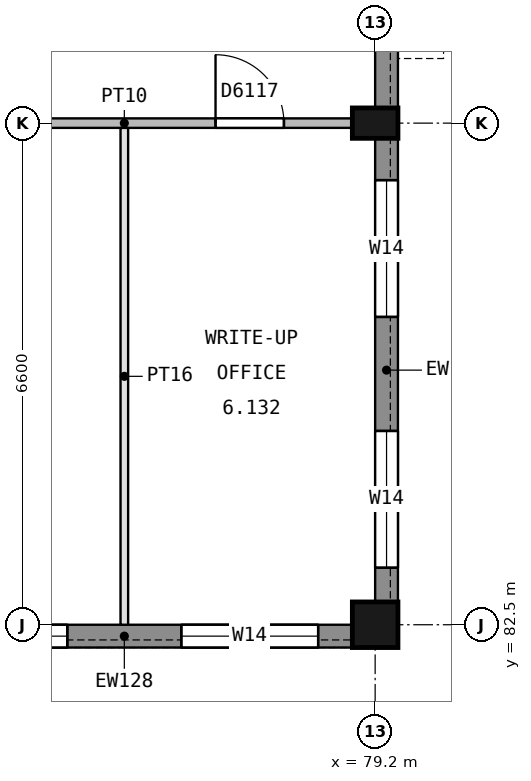
"""IFC4 building model, lengths in metres.
Left out: names, types, materials, properties, quantities, classifications, styles, units other than length and angle.
Written with IfcOpenShell. Run it as: python <this file> out.ifc"""

import sys

from ifc_helpers import new_model, si_unit, direction, frame, frame_2d, origin, origin_2d, place, context, subcontext, project, spatial, rectangle, extrude, element, fill, save


model = new_model("IFC4")
c1 = context("Model", 3, precision=1e-05, world=origin(), true_north=direction((0.0, 1.0)))
c2 = subcontext(c1, "Body", "Model", "MODEL_VIEW")
j1 = project(units=[si_unit("LENGTHUNIT", "METRE"), si_unit("PLANEANGLEUNIT", "RADIAN")], contexts=[c1])
p1 = place(None, origin())
s1 = spatial("IfcSite", under=j1, at=p1, CompositionType="ELEMENT")
p2 = place(p1, origin())
s2 = spatial("IfcBuilding", under=s1, at=p2, CompositionType="ELEMENT")
p3 = place(p2, frame((0.0, 0.0, 5.4)))
s3 = spatial("IfcBuildingStorey", under=s2, at=p3, CompositionType="ELEMENT", Elevation=5.4)
p4 = place(p3, frame((79.2, 82.5, 0.0), z_axis=(0.0, 0.0, 1.0), x_axis=(1.0, 0.0, 0.0)))
e1 = element("IfcColumn", 1, at=p4, inside=s3, PredefinedType="COLUMN", context=c2, shape_type="SweptSolid", body=[
    extrude(rectangle(XDim=0.6, YDim=0.6, at=origin_2d()), origin(), (0.0, 0.0, 1.0), 4.5),
])
p5 = place(p3, frame((79.2, 89.1, 0.0), z_axis=(0.0, 0.0, 1.0), x_axis=(1.0, 0.0, 0.0)))
e2 = element("IfcColumn", 2, at=p5, inside=s3, PredefinedType="COLUMN", context=c2, shape_type="SweptSolid", body=[
    extrude(rectangle(XDim=0.6, YDim=0.4, at=origin_2d()), origin(), (0.0, 0.0, 1.0), 4.5),
])
p6 = place(p3, frame((79.35, 88.9, 0.0), z_axis=(0.0, 0.0, 1.0), x_axis=(0.0, -1.0, 0.0)))
e3 = element("IfcWall", 3, at=p6, inside=s3, PredefinedType="STANDARD", context=c2, shape_type="SweptSolid", body=[
    extrude(rectangle(XDim=6.1, YDim=0.3, at=frame_2d((3.05, 0.0))), origin(), (0.0, 0.0, 1.0), 3.65),
])
p7 = place(p6, frame((3.85, 0.0, 0.9)))
e4 = element("IfcOpeningElement", 4, at=p7, cuts=e3, PredefinedType="OPENING", context=c2, shape_type="SweptSolid", body=[
    extrude(rectangle(XDim=1.8, YDim=1.5, at=frame_2d((0.9, 0.75))), frame((0.0, 0.16, 0.0), z_axis=(0.0, -1.0, 0.0), x_axis=(1.0, 0.0, 0.0)), (0.0, 0.0, 1.0), 0.32),
])
p8 = place(p6, frame((0.55, 0.0, 0.9)))
e5 = element("IfcOpeningElement", 5, at=p8, cuts=e3, PredefinedType="OPENING", context=c2, shape_type="SweptSolid", body=[
    extrude(rectangle(XDim=1.8, YDim=1.5, at=frame_2d((0.9, 0.75))), frame((0.0, 0.16, 0.0), z_axis=(0.0, -1.0, 0.0), x_axis=(1.0, 0.0, 0.0)), (0.0, 0.0, 1.0), 0.32),
])
p9 = place(p3, frame((79.35, 92.4, 0.0), z_axis=(0.0, 0.0, 1.0), x_axis=(0.0, -1.0, 0.0)))
e6 = element("IfcWall", 6, at=p9, inside=s3, PredefinedType="STANDARD", context=c2, shape_type="SweptSolid", body=[
    extrude(rectangle(XDim=3.1, YDim=0.3, at=frame_2d((1.55, 0.0))), origin(), (0.0, 0.0, 1.0), 3.65),
])
p10 = place(p9, frame((1.05, 0.0, 1.1)))
e7 = element("IfcOpeningElement", 7, at=p10, cuts=e6, PredefinedType="OPENING", context=c2, shape_type="SweptSolid", body=[
    extrude(rectangle(XDim=1.2, YDim=1.2, at=frame_2d((0.6, 0.6))), frame((0.0, 0.16, 0.0), z_axis=(0.0, -1.0, 0.0), x_axis=(1.0, 0.0, 0.0)), (0.0, 0.0, 1.0), 0.32),
])
p11 = place(p3, frame((78.9, 82.35, 0.0), z_axis=(0.0, 0.0, 1.0), x_axis=(-1.0, 0.0, 0.0)))
e8 = element("IfcWall", 8, at=p11, inside=s3, PredefinedType="STANDARD", context=c2, shape_type="SweptSolid", body=[
    extrude(rectangle(XDim=6.0, YDim=0.3, at=frame_2d((3.0, 0.0))), origin(), (0.0, 0.0, 1.0), 3.65),
])
p12 = place(p11, frame((3.75, 0.0, 0.9)))
e9 = element("IfcOpeningElement", 9, at=p12, cuts=e8, PredefinedType="OPENING", context=c2, shape_type="SweptSolid", body=[
    extrude(rectangle(XDim=1.8, YDim=1.5, at=frame_2d((0.9, 0.75))), frame((0.0, 0.16, 0.0), z_axis=(0.0, -1.0, 0.0), x_axis=(1.0, 0.0, 0.0)), (0.0, 0.0, 1.0), 0.32),
])
p13 = place(p11, frame((0.45, 0.0, 0.9)))
e10 = element("IfcOpeningElement", 10, at=p13, cuts=e8, PredefinedType="OPENING", context=c2, shape_type="SweptSolid", body=[
    extrude(rectangle(XDim=1.8, YDim=1.5, at=frame_2d((0.9, 0.75))), frame((0.0, 0.16, 0.0), z_axis=(0.0, -1.0, 0.0), x_axis=(1.0, 0.0, 0.0)), (0.0, 0.0, 1.0), 0.32),
])
p14 = place(p3, frame((78.9, 89.1, 0.0), z_axis=(0.0, 0.0, 1.0), x_axis=(-1.0, 0.0, 0.0)))
e11 = element("IfcWall", 11, at=p14, inside=s3, PredefinedType="PARTITIONING", context=c2, shape_type="SweptSolid", body=[
    extrude(rectangle(XDim=6.0, YDim=0.125, at=frame_2d((3.0, 0.0))), origin(), (0.0, 0.0, 1.0), 3.65),
])
p15 = place(p14, frame((4.2, 0.0, 0.0)))
e12 = element("IfcOpeningElement", 12, at=p15, cuts=e11, PredefinedType="OPENING", context=c2, shape_type="SweptSolid", body=[
    extrude(rectangle(XDim=0.9, YDim=2.1, at=frame_2d((0.45, 1.05))), frame((0.0, 0.073, 0.0), z_axis=(0.0, -1.0, 0.0), x_axis=(1.0, 0.0, 0.0)), (0.0, 0.0, 1.0), 0.145),
])
p16 = place(p14, frame((0.9, 0.0, 0.0)))
e13 = element("IfcOpeningElement", 13, at=p16, cuts=e11, PredefinedType="OPENING", context=c2, shape_type="SweptSolid", body=[
    extrude(rectangle(XDim=0.9, YDim=2.1, at=frame_2d((0.45, 1.05))), frame((0.0, 0.073, 0.0), z_axis=(0.0, -1.0, 0.0), x_axis=(1.0, 0.0, 0.0)), (0.0, 0.0, 1.0), 0.145),
])
p17 = place(p3, frame((75.9, 82.5, 0.0), z_axis=(0.0, 0.0, 1.0), x_axis=(0.0, 1.0, 0.0)))
e14 = element("IfcWall", 14, at=p17, inside=s3, PredefinedType="PARTITIONING", context=c2, shape_type="SweptSolid", body=[
    extrude(rectangle(XDim=6.537, YDim=0.1, at=frame_2d((3.269, 0.0))), origin(), (0.0, 0.0, 1.0), 3.65),
])
p18 = place(p7, origin())
e15 = element("IfcWindow", 15, at=p18, inside=s3, PartitioningType="SINGLE_PANEL", PredefinedType="WINDOW", context=c2, shape_type="SweptSolid", body=[
    extrude(rectangle(XDim=1.8, YDim=1.5, at=frame_2d((0.9, 0.75))), frame((0.0, 0.03, 0.0), z_axis=(0.0, -1.0, 0.0), x_axis=(1.0, 0.0, 0.0)), (0.0, 0.0, 1.0), 0.06),
])
fill(e4, e15)
p19 = place(p8, origin())
e16 = element("IfcWindow", 16, at=p19, inside=s3, PartitioningType="SINGLE_PANEL", PredefinedType="WINDOW", context=c2, shape_type="SweptSolid", body=[
    extrude(rectangle(XDim=1.8, YDim=1.5, at=frame_2d((0.9, 0.75))), frame((0.0, 0.03, 0.0), z_axis=(0.0, -1.0, 0.0), x_axis=(1.0, 0.0, 0.0)), (0.0, 0.0, 1.0), 0.06),
])
fill(e5, e16)
p20 = place(p12, origin())
e17 = element("IfcWindow", 17, at=p20, inside=s3, PartitioningType="SINGLE_PANEL", PredefinedType="WINDOW", context=c2, shape_type="SweptSolid", body=[
    extrude(rectangle(XDim=1.8, YDim=1.5, at=frame_2d((0.9, 0.75))), frame((0.0, 0.03, 0.0), z_axis=(0.0, -1.0, 0.0), x_axis=(1.0, 0.0, 0.0)), (0.0, 0.0, 1.0), 0.06),
])
fill(e9, e17)
p21 = place(p13, origin())
e18 = element("IfcWindow", 18, at=p21, inside=s3, PartitioningType="SINGLE_PANEL", PredefinedType="WINDOW", context=c2, shape_type="SweptSolid", body=[
    extrude(rectangle(XDim=1.8, YDim=1.5, at=frame_2d((0.9, 0.75))), frame((0.0, 0.03, 0.0), z_axis=(0.0, -1.0, 0.0), x_axis=(1.0, 0.0, 0.0)), (0.0, 0.0, 1.0), 0.06),
])
fill(e10, e18)
p22 = place(p16, origin())
e19 = element("IfcDoor", 19, at=p22, inside=s3, OperationType="SINGLE_SWING_RIGHT", PredefinedType="DOOR", context=c2, shape_type="SweptSolid", body=[
    extrude(rectangle(XDim=0.9, YDim=2.1, at=frame_2d((0.45, 1.05))), frame((0.0, 0.025, 0.0), z_axis=(0.0, -1.0, 0.0), x_axis=(1.0, 0.0, 0.0)), (0.0, 0.0, 1.0), 0.05),
])
fill(e13, e19)
save(model, sys.argv[1])
